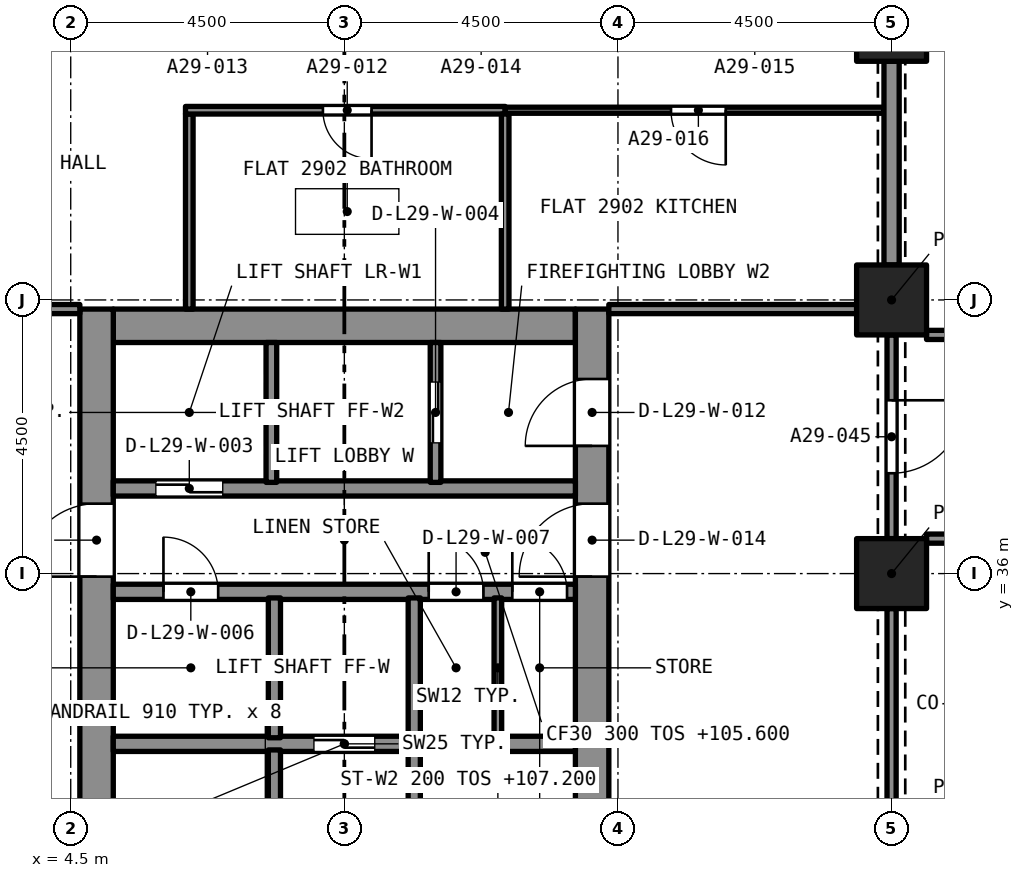
"""IFC4 building model, lengths in metres.
Left out: names, types, materials, properties, quantities, classifications, styles, units other than length and angle.
Written with IfcOpenShell. Run it as: python <this file> out.ifc"""

import sys

from ifc_helpers import new_model, si_unit, direction, frame, frame_2d, origin, origin_2d, place, context, subcontext, project, spatial, rectangle, extrude, element, fill, save


model = new_model("IFC4")
c1 = context("Model", 3, precision=1e-05, world=origin(), true_north=direction((0.0, 1.0)))
c2 = subcontext(c1, "Body", "Model", "MODEL_VIEW")
j1 = project(units=[si_unit("LENGTHUNIT", "METRE"), si_unit("PLANEANGLEUNIT", "RADIAN")], contexts=[c1])
p1 = place(None, origin())
s1 = spatial("IfcSite", under=j1, at=p1, CompositionType="ELEMENT")
p2 = place(p1, origin())
s2 = spatial("IfcBuilding", under=s1, at=p2, CompositionType="ELEMENT")
p3 = place(p2, frame((0.0, 0.0, 105.6)))
s3 = spatial("IfcBuildingStorey", under=s2, at=p3, CompositionType="ELEMENT", Elevation=105.6)
for number, where, z_axis, x_axis in (
    (1, (18.0, 36.0, 0.0), (0.0, 0.0, 1.0), (1.0, 0.0, 0.0)),
    (2, (18.0, 40.5, 0.0), (0.0, 0.0, 1.0), (1.0, 0.0, 0.0)),
    (3, (18.0, 45.0, 0.0), (0.0, 0.0, 1.0), (1.0, 0.0, 0.0)),
):
    element("IfcColumn", number, at=place(p3, frame(where, z_axis=z_axis, x_axis=x_axis)), inside=s3, PredefinedType="COLUMN", context=c2, shape_type="SweptSolid", body=[
        extrude(rectangle(XDim=1.15, YDim=1.15, at=origin_2d()), origin(), (0.0, 0.0, 1.0), 3.2),
    ])
p4 = place(p3, frame((5.2, 40.075, 0.0), z_axis=(0.0, 0.0, 1.0), x_axis=(1.0, 0.0, 0.0)))
e4 = element("IfcWall", 4, at=p4, inside=s3, PredefinedType="SOLIDWALL", context=c2, shape_type="SweptSolid", body=[
    extrude(rectangle(XDim=7.6, YDim=0.55, at=frame_2d((3.8, 0.0))), origin(), (0.0, 0.0, 1.0), 3.2),
])
p5 = place(p3, frame((4.925, 27.15, 0.0), z_axis=(0.0, 0.0, 1.0), x_axis=(0.0, 1.0, 0.0)))
e5 = element("IfcWall", 5, at=p5, inside=s3, PredefinedType="SOLIDWALL", context=c2, shape_type="SweptSolid", body=[
    extrude(rectangle(XDim=13.2, YDim=0.55, at=frame_2d((6.6, 0.0))), origin(), (0.0, 0.0, 1.0), 3.2),
])
p6 = place(p5, frame((8.8, 0.0, 0.0)))
e6 = element("IfcOpeningElement", 6, at=p6, cuts=e5, PredefinedType="OPENING", context=c2, shape_type="SweptSolid", body=[
    extrude(rectangle(XDim=1.2, YDim=2.1, at=frame_2d((0.6, 1.05))), frame((0.0, 0.285, 0.0), z_axis=(0.0, -1.0, 0.0), x_axis=(1.0, 0.0, 0.0)), (0.0, 0.0, 1.0), 0.57),
])
p7 = place(p3, frame((13.075, 27.15, 0.0), z_axis=(0.0, 0.0, 1.0), x_axis=(0.0, 1.0, 0.0)))
e7 = element("IfcWall", 7, at=p7, inside=s3, PredefinedType="SOLIDWALL", context=c2, shape_type="SweptSolid", body=[
    extrude(rectangle(XDim=13.2, YDim=0.55, at=frame_2d((6.6, 0.0))), origin(), (0.0, 0.0, 1.0), 3.2),
])
p8 = place(p7, frame((10.95, 0.0, 0.0)))
e8 = element("IfcOpeningElement", 8, at=p8, cuts=e7, PredefinedType="OPENING", context=c2, shape_type="SweptSolid", body=[
    extrude(rectangle(XDim=1.1, YDim=2.1, at=frame_2d((0.55, 1.05))), frame((0.0, 0.285, 0.0), z_axis=(0.0, -1.0, 0.0), x_axis=(1.0, 0.0, 0.0)), (0.0, 0.0, 1.0), 0.57),
])
p9 = place(p7, frame((8.8, 0.0, 0.0)))
e9 = element("IfcOpeningElement", 9, at=p9, cuts=e7, PredefinedType="OPENING", context=c2, shape_type="SweptSolid", body=[
    extrude(rectangle(XDim=1.2, YDim=2.1, at=frame_2d((0.6, 1.05))), frame((0.0, 0.285, 0.0), z_axis=(0.0, -1.0, 0.0), x_axis=(1.0, 0.0, 0.0)), (0.0, 0.0, 1.0), 0.57),
])
p10 = place(p3, frame((6.45, 40.35, 0.0), z_axis=(0.0, 0.0, 1.0), x_axis=(0.0, 1.0, 0.0)))
e10 = element("IfcWall", 10, at=p10, inside=s3, PredefinedType="PARTITIONING", context=c2, shape_type="SweptSolid", body=[
    extrude(rectangle(XDim=3.208, YDim=0.125, at=frame_2d((1.604, 0.0))), origin(), (0.0, 0.0, 1.0), 2.9),
])
p11 = place(p3, frame((11.645, 43.62, 0.0), z_axis=(0.0, 0.0, 1.0), x_axis=(-1.0, 0.0, 0.0)))
e11 = element("IfcWall", 11, at=p11, inside=s3, PredefinedType="PARTITIONING", context=c2, shape_type="SweptSolid", body=[
    extrude(rectangle(XDim=5.258, YDim=0.125, at=frame_2d((2.629, 0.0))), origin(), (0.0, 0.0, 1.0), 2.9),
])
p12 = place(p11, frame((2.198, 0.0, 0.0)))
e12 = element("IfcOpeningElement", 12, at=p12, cuts=e11, PredefinedType="OPENING", context=c2, shape_type="SweptSolid", body=[
    extrude(rectangle(XDim=0.8, YDim=2.1, at=frame_2d((0.4, 1.05))), frame((0.0, 0.073, 0.0), z_axis=(0.0, -1.0, 0.0), x_axis=(1.0, 0.0, 0.0)), (0.0, 0.0, 1.0), 0.145),
])
p13 = place(p3, frame((11.645, 40.35, 0.0), z_axis=(0.0, 0.0, 1.0), x_axis=(0.0, 1.0, 0.0)))
e13 = element("IfcWall", 13, at=p13, inside=s3, PredefinedType="PARTITIONING", context=c2, shape_type="SweptSolid", body=[
    extrude(rectangle(XDim=3.208, YDim=0.125, at=frame_2d((1.604, 0.0))), origin(), (0.0, 0.0, 1.0), 2.9),
])
p14 = place(p3, frame((17.875, 43.62, 0.0), z_axis=(0.0, 0.0, 1.0), x_axis=(-1.0, 0.0, 0.0)))
e14 = element("IfcWall", 14, at=p14, inside=s3, PredefinedType="PARTITIONING", context=c2, shape_type="SweptSolid", body=[
    extrude(rectangle(XDim=6.23, YDim=0.1, at=frame_2d((3.115, 0.0))), origin(), (0.0, 0.0, 1.0), 2.9),
])
p15 = place(p14, frame((2.602, 0.0, 0.0)))
e15 = element("IfcOpeningElement", 15, at=p15, cuts=e14, PredefinedType="OPENING", context=c2, shape_type="SweptSolid", body=[
    extrude(rectangle(XDim=0.9, YDim=2.1, at=frame_2d((0.45, 1.05))), frame((0.0, 0.06, 0.0), z_axis=(0.0, -1.0, 0.0), x_axis=(1.0, 0.0, 0.0)), (0.0, 0.0, 1.0), 0.12),
])
p16 = place(p3, frame((0.575, 40.35, 0.0), z_axis=(0.0, 0.0, 1.0), x_axis=(1.0, 0.0, 0.0)))
e16 = element("IfcWall", 16, at=p16, inside=s3, PredefinedType="PARTITIONING", context=c2, shape_type="SweptSolid", body=[
    extrude(rectangle(XDim=4.075, YDim=0.15, at=frame_2d((2.038, 0.0))), origin(), (0.0, 0.0, 1.0), 2.9),
])
p17 = place(p16, frame((1.175, 0.0, 0.0)))
e17 = element("IfcOpeningElement", 17, at=p17, cuts=e16, PredefinedType="OPENING", context=c2, shape_type="SweptSolid", body=[
    extrude(rectangle(XDim=1.0, YDim=2.1, at=frame_2d((0.5, 1.05))), frame((0.0, 0.085, 0.0), z_axis=(0.0, -1.0, 0.0), x_axis=(1.0, 0.0, 0.0)), (0.0, 0.0, 1.0), 0.17),
])
p18 = place(p3, frame((18.0, 41.075, 0.0), z_axis=(0.0, 0.0, 1.0), x_axis=(0.0, 1.0, 0.0)))
e18 = element("IfcWall", 18, at=p18, inside=s3, PredefinedType="PARTITIONING", context=c2, shape_type="SweptSolid", body=[
    extrude(rectangle(XDim=3.35, YDim=0.25, at=frame_2d((1.675, 0.0))), origin(), (0.0, 0.0, 1.0), 2.38),
])
p19 = place(p3, frame((13.35, 40.35, 0.0), z_axis=(0.0, 0.0, 1.0), x_axis=(1.0, 0.0, 0.0)))
e19 = element("IfcWall", 19, at=p19, inside=s3, PredefinedType="PARTITIONING", context=c2, shape_type="SweptSolid", body=[
    extrude(rectangle(XDim=4.075, YDim=0.15, at=frame_2d((2.038, 0.0))), origin(), (0.0, 0.0, 1.0), 2.9),
])
p20 = place(p3, frame((18.575, 39.925, 0.0), z_axis=(0.0, 0.0, 1.0), x_axis=(1.0, 0.0, 0.0)))
e20 = element("IfcWall", 20, at=p20, inside=s3, PredefinedType="PARTITIONING", context=c2, shape_type="SweptSolid", body=[
    extrude(rectangle(XDim=8.425, YDim=0.15, at=frame_2d((4.212, 0.0))), origin(), (0.0, 0.0, 1.0), 2.75),
])
p21 = place(p20, frame((3.425, 0.0, 0.0)))
e21 = element("IfcOpeningElement", 21, at=p21, cuts=e20, PredefinedType="OPENING", context=c2, shape_type="SweptSolid", body=[
    extrude(rectangle(XDim=1.0, YDim=2.1, at=frame_2d((0.5, 1.05))), frame((0.0, 0.085, 0.0), z_axis=(0.0, -1.0, 0.0), x_axis=(1.0, 0.0, 0.0)), (0.0, 0.0, 1.0), 0.17),
])
p22 = place(p3, frame((22.5, 36.575, 0.0), z_axis=(0.0, 0.0, 1.0), x_axis=(-1.0, 0.0, 0.0)))
e22 = element("IfcWall", 22, at=p22, inside=s3, PredefinedType="PARTITIONING", context=c2, shape_type="SweptSolid", body=[
    extrude(rectangle(XDim=3.925, YDim=0.15, at=frame_2d((1.962, 0.0))), origin(), (0.0, 0.0, 1.0), 2.75),
])
p23 = place(p22, frame((1.75, 0.0, 0.0)))
e23 = element("IfcOpeningElement", 23, at=p23, cuts=e22, PredefinedType="OPENING", context=c2, shape_type="SweptSolid", body=[
    extrude(rectangle(XDim=1.0, YDim=2.1, at=frame_2d((0.5, 1.05))), frame((0.0, 0.085, 0.0), z_axis=(0.0, -1.0, 0.0), x_axis=(1.0, 0.0, 0.0)), (0.0, 0.0, 1.0), 0.17),
])
p24 = place(p3, frame((18.0, 39.925, 0.0), z_axis=(0.0, 0.0, 1.0), x_axis=(0.0, -1.0, 0.0)))
e24 = element("IfcWall", 24, at=p24, inside=s3, PredefinedType="PARTITIONING", context=c2, shape_type="SweptSolid", body=[
    extrude(rectangle(XDim=3.35, YDim=0.15, at=frame_2d((1.675, 0.0))), origin(), (0.0, 0.0, 1.0), 2.38),
])
p25 = place(p24, frame((1.075, 0.0, 0.0)))
e25 = element("IfcOpeningElement", 25, at=p25, cuts=e24, PredefinedType="OPENING", context=c2, shape_type="SweptSolid", body=[
    extrude(rectangle(XDim=1.2, YDim=2.1, at=frame_2d((0.6, 1.05))), frame((0.0, 0.085, 0.0), z_axis=(0.0, -1.0, 0.0), x_axis=(1.0, 0.0, 0.0)), (0.0, 0.0, 1.0), 0.17),
])
p26 = place(p3, frame((18.0, 32.075, 0.0), z_axis=(0.0, 0.0, 1.0), x_axis=(0.0, 1.0, 0.0)))
e26 = element("IfcWall", 26, at=p26, inside=s3, PredefinedType="PARTITIONING", context=c2, shape_type="SweptSolid", body=[
    extrude(rectangle(XDim=3.35, YDim=0.15, at=frame_2d((1.675, 0.0))), origin(), (0.0, 0.0, 1.0), 2.38),
])
p27 = place(p3, frame((5.2, 33.2, 0.0), z_axis=(0.0, 0.0, 1.0), x_axis=(1.0, 0.0, 0.0)))
e27 = element("IfcWall", 27, at=p27, inside=s3, PredefinedType="SOLIDWALL", context=c2, shape_type="SweptSolid", body=[
    extrude(rectangle(XDim=7.6, YDim=0.25, at=frame_2d((3.8, 0.0))), origin(), (0.0, 0.0, 1.0), 2.9),
])
p28 = place(p27, frame((3.3, 0.0, 0.0)))
e28 = element("IfcOpeningElement", 28, at=p28, cuts=e27, PredefinedType="OPENING", context=c2, shape_type="SweptSolid", body=[
    extrude(rectangle(XDim=1.0, YDim=2.1, at=frame_2d((0.5, 1.05))), frame((0.0, 0.135, 0.0), z_axis=(0.0, -1.0, 0.0), x_axis=(1.0, 0.0, 0.0)), (0.0, 0.0, 1.0), 0.27),
])
p29 = place(p3, frame((5.2, 35.7, 0.0), z_axis=(0.0, 0.0, 1.0), x_axis=(1.0, 0.0, 0.0)))
e29 = element("IfcWall", 29, at=p29, inside=s3, PredefinedType="SOLIDWALL", context=c2, shape_type="SweptSolid", body=[
    extrude(rectangle(XDim=7.6, YDim=0.25, at=frame_2d((3.8, 0.0))), origin(), (0.0, 0.0, 1.0), 2.9),
])
p30 = place(p29, frame((0.825, 0.0, 0.0)))
e30 = element("IfcOpeningElement", 30, at=p30, cuts=e29, PredefinedType="OPENING", context=c2, shape_type="SweptSolid", body=[
    extrude(rectangle(XDim=0.9, YDim=2.1, at=frame_2d((0.45, 1.05))), frame((0.0, 0.135, 0.0), z_axis=(0.0, -1.0, 0.0), x_axis=(1.0, 0.0, 0.0)), (0.0, 0.0, 1.0), 0.27),
])
p31 = place(p29, frame((5.188, 0.0, 0.0)))
e31 = element("IfcOpeningElement", 31, at=p31, cuts=e29, PredefinedType="OPENING", context=c2, shape_type="SweptSolid", body=[
    extrude(rectangle(XDim=0.9, YDim=2.1, at=frame_2d((0.45, 1.05))), frame((0.0, 0.135, 0.0), z_axis=(0.0, -1.0, 0.0), x_axis=(1.0, 0.0, 0.0)), (0.0, 0.0, 1.0), 0.27),
])
p32 = place(p29, frame((6.562, 0.0, 0.0)))
e32 = element("IfcOpeningElement", 32, at=p32, cuts=e29, PredefinedType="OPENING", context=c2, shape_type="SweptSolid", body=[
    extrude(rectangle(XDim=0.9, YDim=2.1, at=frame_2d((0.45, 1.05))), frame((0.0, 0.135, 0.0), z_axis=(0.0, -1.0, 0.0), x_axis=(1.0, 0.0, 0.0)), (0.0, 0.0, 1.0), 0.27),
])
p33 = place(p3, frame((5.2, 37.4, 0.0), z_axis=(0.0, 0.0, 1.0), x_axis=(1.0, 0.0, 0.0)))
e33 = element("IfcWall", 33, at=p33, inside=s3, PredefinedType="SOLIDWALL", context=c2, shape_type="SweptSolid", body=[
    extrude(rectangle(XDim=7.6, YDim=0.25, at=frame_2d((3.8, 0.0))), origin(), (0.0, 0.0, 1.0), 2.9),
])
p34 = place(p33, frame((0.7, 0.0, 0.0)))
e34 = element("IfcOpeningElement", 34, at=p34, cuts=e33, PredefinedType="OPENING", context=c2, shape_type="SweptSolid", body=[
    extrude(rectangle(XDim=1.1, YDim=2.4, at=frame_2d((0.55, 1.2))), frame((0.0, 0.135, 0.0), z_axis=(0.0, -1.0, 0.0), x_axis=(1.0, 0.0, 0.0)), (0.0, 0.0, 1.0), 0.27),
])
p35 = place(p3, frame((7.85, 27.7, 0.0), z_axis=(0.0, 0.0, 1.0), x_axis=(0.0, 1.0, 0.0)))
e35 = element("IfcWall", 35, at=p35, inside=s3, PredefinedType="SOLIDWALL", context=c2, shape_type="SweptSolid", body=[
    extrude(rectangle(XDim=5.4, YDim=0.2, at=frame_2d((2.7, 0.0))), origin(), (0.0, 0.0, 1.0), 2.9),
])
p36 = place(p35, frame((0.2, 0.0, 0.0)))
e36 = element("IfcOpeningElement", 36, at=p36, cuts=e35, PredefinedType="OPENING", context=c2, shape_type="SweptSolid", body=[
    extrude(rectangle(XDim=0.9, YDim=2.1, at=frame_2d((0.45, 1.05))), frame((0.0, 0.11, 0.0), z_axis=(0.0, -1.0, 0.0), x_axis=(1.0, 0.0, 0.0)), (0.0, 0.0, 1.0), 0.22),
])
p37 = place(p3, frame((10.15, 27.7, 0.0), z_axis=(0.0, 0.0, 1.0), x_axis=(0.0, 1.0, 0.0)))
e37 = element("IfcWall", 37, at=p37, inside=s3, PredefinedType="SOLIDWALL", context=c2, shape_type="SweptSolid", body=[
    extrude(rectangle(XDim=5.4, YDim=0.2, at=frame_2d((2.7, 0.0))), origin(), (0.0, 0.0, 1.0), 2.9),
])
p38 = place(p37, frame((0.2, 0.0, 0.0)))
e38 = element("IfcOpeningElement", 38, at=p38, cuts=e37, PredefinedType="OPENING", context=c2, shape_type="SweptSolid", body=[
    extrude(rectangle(XDim=0.9, YDim=2.1, at=frame_2d((0.45, 1.05))), frame((0.0, 0.11, 0.0), z_axis=(0.0, -1.0, 0.0), x_axis=(1.0, 0.0, 0.0)), (0.0, 0.0, 1.0), 0.22),
])
for number, where, z_axis, x_axis in (
    (39, (7.85, 33.3, 0.0), (0.0, 0.0, 1.0), (0.0, 1.0, 0.0)),
    (40, (10.15, 33.3, 0.0), (0.0, 0.0, 1.0), (0.0, 1.0, 0.0)),
):
    element("IfcWall", number, at=place(p3, frame(where, z_axis=z_axis, x_axis=x_axis)), inside=s3, PredefinedType="SOLIDWALL", context=c2, shape_type="SweptSolid", body=[
        extrude(rectangle(XDim=2.3, YDim=0.2, at=frame_2d((1.15, 0.0))), origin(), (0.0, 0.0, 1.0), 2.9),
    ])
p39 = place(p3, frame((7.8, 37.5, 0.0), z_axis=(0.0, 0.0, 1.0), x_axis=(0.0, 1.0, 0.0)))
e41 = element("IfcWall", 41, at=p39, inside=s3, PredefinedType="SOLIDWALL", context=c2, shape_type="SweptSolid", body=[
    extrude(rectangle(XDim=2.3, YDim=0.175, at=frame_2d((1.15, 0.0))), origin(), (0.0, 0.0, 1.0), 2.9),
])
p40 = place(p3, frame((10.5, 37.5, 0.0), z_axis=(0.0, 0.0, 1.0), x_axis=(0.0, 1.0, 0.0)))
e42 = element("IfcWall", 42, at=p40, inside=s3, PredefinedType="SOLIDWALL", context=c2, shape_type="SweptSolid", body=[
    extrude(rectangle(XDim=2.3, YDim=0.175, at=frame_2d((1.15, 0.0))), origin(), (0.0, 0.0, 1.0), 2.9),
])
p41 = place(p40, frame((0.65, 0.0, 0.0)))
e43 = element("IfcOpeningElement", 43, at=p41, cuts=e42, PredefinedType="OPENING", context=c2, shape_type="SweptSolid", body=[
    extrude(rectangle(XDim=1.0, YDim=2.1, at=frame_2d((0.5, 1.05))), frame((0.0, 0.097, 0.0), z_axis=(0.0, -1.0, 0.0), x_axis=(1.0, 0.0, 0.0)), (0.0, 0.0, 1.0), 0.195),
])
p42 = place(p3, frame((11.525, 33.3, 0.0), z_axis=(0.0, 0.0, 1.0), x_axis=(0.0, 1.0, 0.0)))
e44 = element("IfcWall", 44, at=p42, inside=s3, PredefinedType="PARTITIONING", context=c2, shape_type="SweptSolid", body=[
    extrude(rectangle(XDim=2.3, YDim=0.125, at=frame_2d((1.15, 0.0))), origin(), (0.0, 0.0, 1.0), 2.9),
])
p43 = place(p12, origin())
e45 = element("IfcDoor", 45, at=p43, inside=s3, OperationType="SINGLE_SWING_LEFT", PredefinedType="DOOR", context=c2, shape_type="SweptSolid", body=[
    extrude(rectangle(XDim=0.8, YDim=2.1, at=frame_2d((0.4, 1.05))), frame((0.0, 0.025, 0.0), z_axis=(0.0, -1.0, 0.0), x_axis=(1.0, 0.0, 0.0)), (0.0, 0.0, 1.0), 0.05),
])
fill(e12, e45)
p44 = place(p15, origin())
e46 = element("IfcDoor", 46, at=p44, inside=s3, OperationType="SINGLE_SWING_LEFT", PredefinedType="DOOR", context=c2, shape_type="SweptSolid", body=[
    extrude(rectangle(XDim=0.9, YDim=2.1, at=frame_2d((0.45, 1.05))), frame((0.0, 0.025, 0.0), z_axis=(0.0, -1.0, 0.0), x_axis=(1.0, 0.0, 0.0)), (0.0, 0.0, 1.0), 0.05),
])
fill(e15, e46)
p45 = place(p25, origin())
e47 = element("IfcDoor", 47, at=p45, inside=s3, OperationType="SINGLE_SWING_LEFT", PredefinedType="DOOR", context=c2, shape_type="SweptSolid", body=[
    extrude(rectangle(XDim=1.2, YDim=2.1, at=frame_2d((0.6, 1.05))), frame((0.0, 0.025, 0.0), z_axis=(0.0, -1.0, 0.0), x_axis=(1.0, 0.0, 0.0)), (0.0, 0.0, 1.0), 0.05),
])
fill(e25, e47)
p46 = place(p34, origin())
e48 = element("IfcDoor", 48, at=p46, inside=s3, OperationType="SLIDING_TO_LEFT", PredefinedType="DOOR", context=c2, shape_type="SweptSolid", body=[
    extrude(rectangle(XDim=1.1, YDim=2.4, at=frame_2d((0.55, 1.2))), frame((0.0, 0.025, 0.0), z_axis=(0.0, -1.0, 0.0), x_axis=(1.0, 0.0, 0.0)), (0.0, 0.0, 1.0), 0.05),
])
fill(e34, e48)
p47 = place(p41, origin())
e49 = element("IfcDoor", 49, at=p47, inside=s3, OperationType="SLIDING_TO_LEFT", PredefinedType="DOOR", context=c2, shape_type="SweptSolid", body=[
    extrude(rectangle(XDim=1.0, YDim=2.1, at=frame_2d((0.5, 1.05))), frame((0.0, 0.025, 0.0), z_axis=(0.0, -1.0, 0.0), x_axis=(1.0, 0.0, 0.0)), (0.0, 0.0, 1.0), 0.05),
])
fill(e43, e49)
p48 = place(p28, origin())
e50 = element("IfcDoor", 50, at=p48, inside=s3, OperationType="SLIDING_TO_LEFT", PredefinedType="DOOR", context=c2, shape_type="SweptSolid", body=[
    extrude(rectangle(XDim=1.0, YDim=2.1, at=frame_2d((0.5, 1.05))), frame((0.0, 0.025, 0.0), z_axis=(0.0, -1.0, 0.0), x_axis=(1.0, 0.0, 0.0)), (0.0, 0.0, 1.0), 0.05),
])
fill(e28, e50)
p49 = place(p30, origin())
e51 = element("IfcDoor", 51, at=p49, inside=s3, OperationType="SINGLE_SWING_LEFT", PredefinedType="DOOR", context=c2, shape_type="SweptSolid", body=[
    extrude(rectangle(XDim=0.9, YDim=2.1, at=frame_2d((0.45, 1.05))), frame((0.0, 0.025, 0.0), z_axis=(0.0, -1.0, 0.0), x_axis=(1.0, 0.0, 0.0)), (0.0, 0.0, 1.0), 0.05),
])
fill(e30, e51)
p50 = place(p31, origin())
e52 = element("IfcDoor", 52, at=p50, inside=s3, OperationType="SINGLE_SWING_LEFT", PredefinedType="DOOR", context=c2, shape_type="SweptSolid", body=[
    extrude(rectangle(XDim=0.9, YDim=2.1, at=frame_2d((0.45, 1.05))), frame((0.0, 0.025, 0.0), z_axis=(0.0, -1.0, 0.0), x_axis=(1.0, 0.0, 0.0)), (0.0, 0.0, 1.0), 0.05),
])
fill(e31, e52)
p51 = place(p32, origin())
e53 = element("IfcDoor", 53, at=p51, inside=s3, OperationType="SINGLE_SWING_LEFT", PredefinedType="DOOR", context=c2, shape_type="SweptSolid", body=[
    extrude(rectangle(XDim=0.9, YDim=2.1, at=frame_2d((0.45, 1.05))), frame((0.0, 0.025, 0.0), z_axis=(0.0, -1.0, 0.0), x_axis=(1.0, 0.0, 0.0)), (0.0, 0.0, 1.0), 0.05),
])
fill(e32, e53)
p52 = place(p8, origin())
e54 = element("IfcDoor", 54, at=p52, inside=s3, OperationType="SINGLE_SWING_LEFT", PredefinedType="DOOR", context=c2, shape_type="SweptSolid", body=[
    extrude(rectangle(XDim=1.1, YDim=2.1, at=frame_2d((0.55, 1.05))), frame((0.0, 0.025, 0.0), z_axis=(0.0, -1.0, 0.0), x_axis=(1.0, 0.0, 0.0)), (0.0, 0.0, 1.0), 0.05),
])
fill(e8, e54)
p53 = place(p6, origin())
e55 = element("IfcDoor", 55, at=p53, inside=s3, OperationType="SINGLE_SWING_LEFT", PredefinedType="DOOR", context=c2, shape_type="SweptSolid", body=[
    extrude(rectangle(XDim=1.2, YDim=2.1, at=frame_2d((0.6, 1.05))), frame((0.0, 0.025, 0.0), z_axis=(0.0, -1.0, 0.0), x_axis=(1.0, 0.0, 0.0)), (0.0, 0.0, 1.0), 0.05),
])
fill(e6, e55)
p54 = place(p9, origin())
e56 = element("IfcDoor", 56, at=p54, inside=s3, OperationType="SINGLE_SWING_LEFT", PredefinedType="DOOR", context=c2, shape_type="SweptSolid", body=[
    extrude(rectangle(XDim=1.2, YDim=2.1, at=frame_2d((0.6, 1.05))), frame((0.0, 0.025, 0.0), z_axis=(0.0, -1.0, 0.0), x_axis=(1.0, 0.0, 0.0)), (0.0, 0.0, 1.0), 0.05),
])
fill(e9, e56)
save(model, sys.argv[1])
